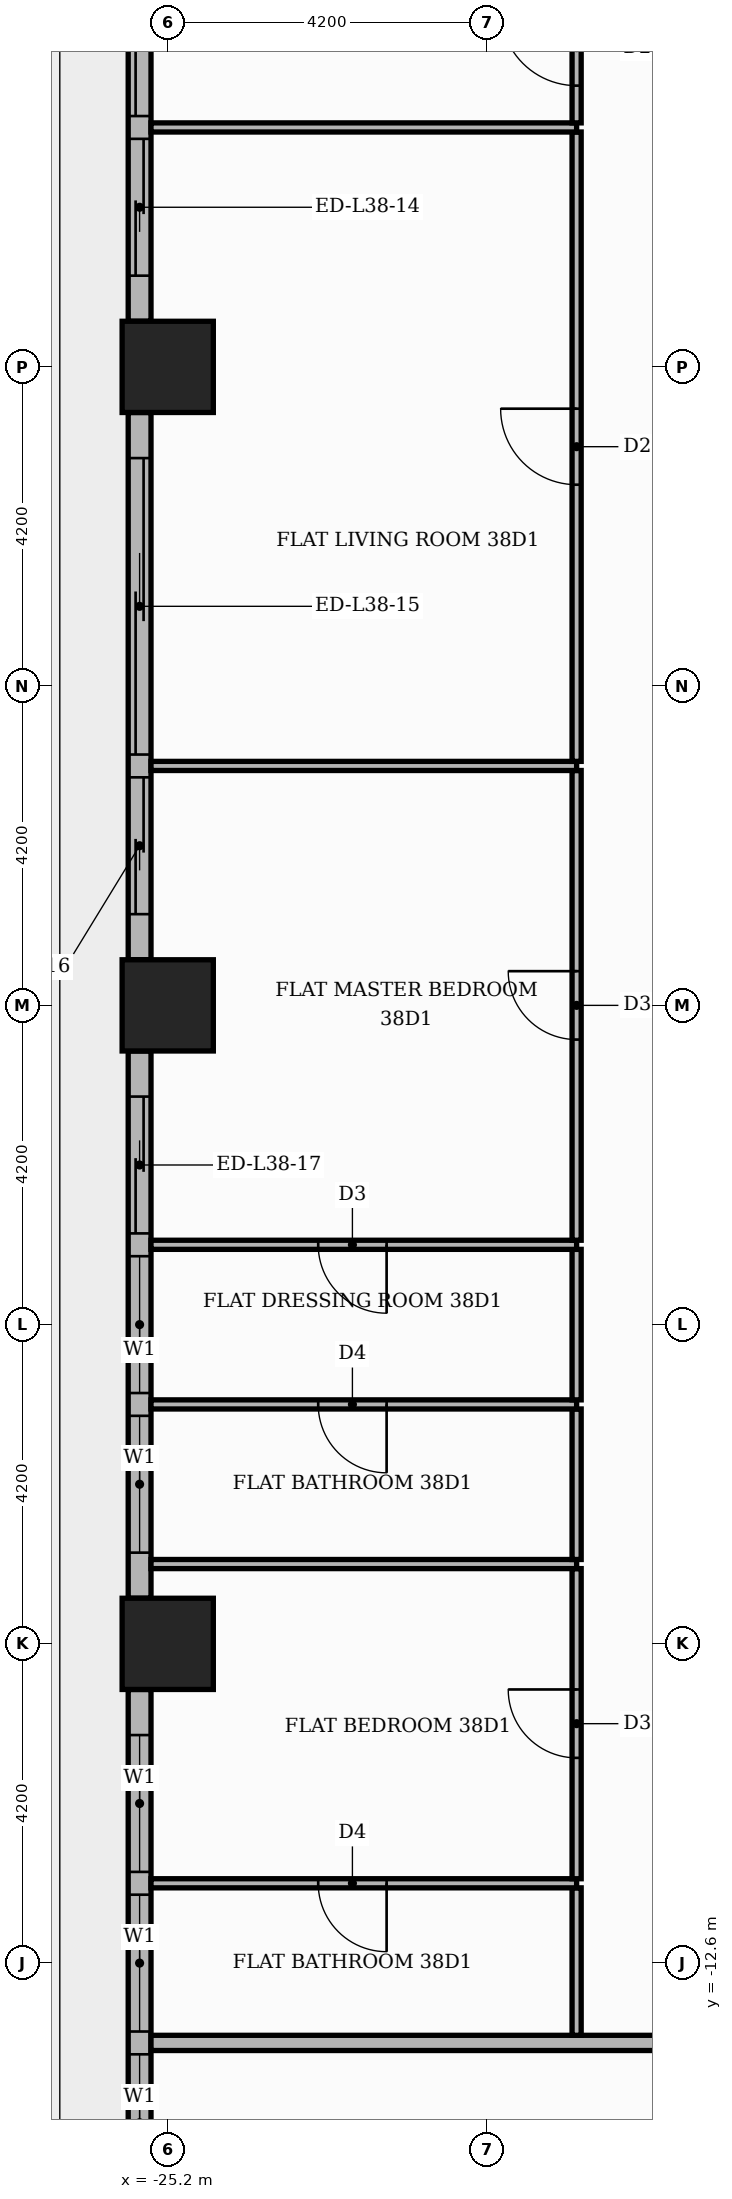
"""IFC4 building model, lengths in metres.
Left out: names, types, materials, properties, quantities, classifications, styles, units other than length and angle.
Written with IfcOpenShell. Run it as: python <this file> out.ifc"""

import sys

from ifc_helpers import new_model, si_unit, direction, frame, frame_2d, origin, origin_2d, place, context, subcontext, project, spatial, rectangle, extrude, element, fill, save


model = new_model("IFC4")
c1 = context("Model", 3, precision=1e-05, world=origin(), true_north=direction((0.0, 1.0)))
c2 = subcontext(c1, "Body", "Model", "MODEL_VIEW")
j1 = project(units=[si_unit("LENGTHUNIT", "METRE"), si_unit("PLANEANGLEUNIT", "RADIAN")], contexts=[c1])
p1 = place(None, origin())
s1 = spatial("IfcSite", under=j1, at=p1, CompositionType="ELEMENT")
p2 = place(p1, origin())
s2 = spatial("IfcBuilding", under=s1, at=p2, CompositionType="ELEMENT")
p3 = place(p2, frame((0.0, 0.0, 161.1)))
s3 = spatial("IfcBuildingStorey", under=s2, at=p3, CompositionType="ELEMENT", Elevation=161.1)
for number, where, z_axis, x_axis in (
    (1, (-25.2, 0.0, 0.0), (0.0, 0.0, 1.0), (1.0, 0.0, 0.0)),
    (2, (-25.2, -8.4, 0.0), (0.0, 0.0, 1.0), (1.0, 0.0, 0.0)),
    (3, (-25.2, 8.4, 0.0), (0.0, 0.0, 1.0), (1.0, 0.0, 0.0)),
):
    element("IfcColumn", number, at=place(p3, frame(where, z_axis=z_axis, x_axis=x_axis)), inside=s3, PredefinedType="COLUMN", context=c2, shape_type="SweptSolid", body=[
        extrude(rectangle(XDim=1.2, YDim=1.2, at=origin_2d()), origin(), (0.0, 0.0, 1.0), 3.9),
    ])
p4 = place(p3, frame((-25.57, 16.2, 0.0), z_axis=(0.0, 0.0, 1.0), x_axis=(0.0, -1.0, 0.0)))
e4 = element("IfcWall", 4, at=p4, inside=s3, PredefinedType="STANDARD", context=c2, shape_type="SweptSolid", body=[
    extrude(rectangle(XDim=7.2, YDim=0.3, at=frame_2d((3.6, 0.0))), origin(), (0.0, 0.0, 1.0), 3.48),
])
p5 = place(p4, frame((0.6, 0.0, 0.0)))
e5 = element("IfcOpeningElement", 5, at=p5, cuts=e4, PredefinedType="OPENING", context=c2, shape_type="SweptSolid", body=[
    extrude(rectangle(XDim=3.9, YDim=2.4, at=frame_2d((1.95, 1.2))), frame((0.0, 0.16, 0.0), z_axis=(0.0, -1.0, 0.0), x_axis=(1.0, 0.0, 0.0)), (0.0, 0.0, 1.0), 0.32),
])
p6 = place(p4, frame((4.8, 0.0, 0.0)))
e6 = element("IfcOpeningElement", 6, at=p6, cuts=e4, PredefinedType="OPENING", context=c2, shape_type="SweptSolid", body=[
    extrude(rectangle(XDim=1.8, YDim=2.4, at=frame_2d((0.9, 1.2))), frame((0.0, 0.16, 0.0), z_axis=(0.0, -1.0, 0.0), x_axis=(1.0, 0.0, 0.0)), (0.0, 0.0, 1.0), 0.32),
])
p7 = place(p3, frame((-25.57, 7.8, 0.0), z_axis=(0.0, 0.0, 1.0), x_axis=(0.0, -1.0, 0.0)))
e7 = element("IfcWall", 7, at=p7, inside=s3, PredefinedType="STANDARD", context=c2, shape_type="SweptSolid", body=[
    extrude(rectangle(XDim=7.2, YDim=0.3, at=frame_2d((3.6, 0.0))), origin(), (0.0, 0.0, 1.0), 3.48),
])
p8 = place(p7, frame((0.6, 0.0, 0.0)))
e8 = element("IfcOpeningElement", 8, at=p8, cuts=e7, PredefinedType="OPENING", context=c2, shape_type="SweptSolid", body=[
    extrude(rectangle(XDim=3.9, YDim=2.4, at=frame_2d((1.95, 1.2))), frame((0.0, 0.16, 0.0), z_axis=(0.0, -1.0, 0.0), x_axis=(1.0, 0.0, 0.0)), (0.0, 0.0, 1.0), 0.32),
])
p9 = place(p7, frame((4.8, 0.0, 0.0)))
e9 = element("IfcOpeningElement", 9, at=p9, cuts=e7, PredefinedType="OPENING", context=c2, shape_type="SweptSolid", body=[
    extrude(rectangle(XDim=1.8, YDim=2.4, at=frame_2d((0.9, 1.2))), frame((0.0, 0.16, 0.0), z_axis=(0.0, -1.0, 0.0), x_axis=(1.0, 0.0, 0.0)), (0.0, 0.0, 1.0), 0.32),
])
p10 = place(p3, frame((-25.57, -0.6, 0.0), z_axis=(0.0, 0.0, 1.0), x_axis=(0.0, -1.0, 0.0)))
e10 = element("IfcWall", 10, at=p10, inside=s3, PredefinedType="STANDARD", context=c2, shape_type="SweptSolid", body=[
    extrude(rectangle(XDim=7.2, YDim=0.3, at=frame_2d((3.6, 0.0))), origin(), (0.0, 0.0, 1.0), 3.48),
])
p11 = place(p10, frame((0.6, 0.0, 0.0)))
e11 = element("IfcOpeningElement", 11, at=p11, cuts=e10, PredefinedType="OPENING", context=c2, shape_type="SweptSolid", body=[
    extrude(rectangle(XDim=1.8, YDim=2.4, at=frame_2d((0.9, 1.2))), frame((0.0, 0.16, 0.0), z_axis=(0.0, -1.0, 0.0), x_axis=(1.0, 0.0, 0.0)), (0.0, 0.0, 1.0), 0.32),
])
p12 = place(p10, frame((2.7, 0.0, 0.9)))
e12 = element("IfcOpeningElement", 12, at=p12, cuts=e10, PredefinedType="OPENING", context=c2, shape_type="SweptSolid", body=[
    extrude(rectangle(XDim=1.8, YDim=2.1, at=frame_2d((0.9, 1.05))), frame((0.0, 0.16, 0.0), z_axis=(0.0, -1.0, 0.0), x_axis=(1.0, 0.0, 0.0)), (0.0, 0.0, 1.0), 0.32),
])
p13 = place(p10, frame((4.8, 0.0, 0.9)))
e13 = element("IfcOpeningElement", 13, at=p13, cuts=e10, PredefinedType="OPENING", context=c2, shape_type="SweptSolid", body=[
    extrude(rectangle(XDim=1.8, YDim=2.1, at=frame_2d((0.9, 1.05))), frame((0.0, 0.16, 0.0), z_axis=(0.0, -1.0, 0.0), x_axis=(1.0, 0.0, 0.0)), (0.0, 0.0, 1.0), 0.32),
])
p14 = place(p3, frame((-25.57, -9.0, 0.0), z_axis=(0.0, 0.0, 1.0), x_axis=(0.0, -1.0, 0.0)))
e14 = element("IfcWall", 14, at=p14, inside=s3, PredefinedType="STANDARD", context=c2, shape_type="SweptSolid", body=[
    extrude(rectangle(XDim=7.2, YDim=0.3, at=frame_2d((3.6, 0.0))), origin(), (0.0, 0.0, 1.0), 3.48),
])
p15 = place(p14, frame((0.6, 0.0, 0.9)))
e15 = element("IfcOpeningElement", 15, at=p15, cuts=e14, PredefinedType="OPENING", context=c2, shape_type="SweptSolid", body=[
    extrude(rectangle(XDim=1.8, YDim=2.1, at=frame_2d((0.9, 1.05))), frame((0.0, 0.16, 0.0), z_axis=(0.0, -1.0, 0.0), x_axis=(1.0, 0.0, 0.0)), (0.0, 0.0, 1.0), 0.32),
])
p16 = place(p14, frame((2.7, 0.0, 0.9)))
e16 = element("IfcOpeningElement", 16, at=p16, cuts=e14, PredefinedType="OPENING", context=c2, shape_type="SweptSolid", body=[
    extrude(rectangle(XDim=1.8, YDim=2.1, at=frame_2d((0.9, 1.05))), frame((0.0, 0.16, 0.0), z_axis=(0.0, -1.0, 0.0), x_axis=(1.0, 0.0, 0.0)), (0.0, 0.0, 1.0), 0.32),
])
p17 = place(p14, frame((4.8, 0.0, 0.9)))
e17 = element("IfcOpeningElement", 17, at=p17, cuts=e14, PredefinedType="OPENING", context=c2, shape_type="SweptSolid", body=[
    extrude(rectangle(XDim=1.8, YDim=2.1, at=frame_2d((0.9, 1.05))), frame((0.0, 0.16, 0.0), z_axis=(0.0, -1.0, 0.0), x_axis=(1.0, 0.0, 0.0)), (0.0, 0.0, 1.0), 0.32),
])
p18 = place(p3, frame((-25.42, -13.65, 0.0), z_axis=(0.0, 0.0, 1.0), x_axis=(1.0, 0.0, 0.0)))
e18 = element("IfcWall", 18, at=p18, inside=s3, PredefinedType="PARTITIONING", context=c2, shape_type="SweptSolid", body=[
    extrude(rectangle(XDim=39.07, YDim=0.2, at=frame_2d((19.535, 0.0))), origin(), (0.0, 0.0, 1.0), 3.48),
])
p19 = place(p18, frame((13.32, 0.0, 0.0)))
e19 = element("IfcOpeningElement", 19, at=p19, cuts=e18, PredefinedType="OPENING", context=c2, shape_type="SweptSolid", body=[
    extrude(rectangle(XDim=1.1, YDim=2.4, at=frame_2d((0.55, 1.2))), frame((0.0, 0.11, 0.0), z_axis=(0.0, -1.0, 0.0), x_axis=(1.0, 0.0, 0.0)), (0.0, 0.0, 1.0), 0.22),
])
p20 = place(p18, frame((21.72, 0.0, 0.0)))
e20 = element("IfcOpeningElement", 20, at=p20, cuts=e18, PredefinedType="OPENING", context=c2, shape_type="SweptSolid", body=[
    extrude(rectangle(XDim=1.1, YDim=2.4, at=frame_2d((0.55, 1.2))), frame((0.0, 0.11, 0.0), z_axis=(0.0, -1.0, 0.0), x_axis=(1.0, 0.0, 0.0)), (0.0, 0.0, 1.0), 0.22),
])
p21 = place(p3, frame((-19.82, -13.55, 0.0), z_axis=(0.0, 0.0, 1.0), x_axis=(0.0, 1.0, 0.0)))
e21 = element("IfcWall", 21, at=p21, inside=s3, PredefinedType="PARTITIONING", context=c2, shape_type="SweptSolid", body=[
    extrude(rectangle(XDim=1.94, YDim=0.12, at=frame_2d((0.97, 0.0))), origin(), (0.0, 0.0, 1.0), 3.48),
])
p22 = place(p3, frame((-25.42, -11.55, 0.0), z_axis=(0.0, 0.0, 1.0), x_axis=(1.0, 0.0, 0.0)))
e22 = element("IfcWall", 22, at=p22, inside=s3, PredefinedType="PARTITIONING", context=c2, shape_type="SweptSolid", body=[
    extrude(rectangle(XDim=5.6, YDim=0.12, at=frame_2d((2.8, 0.0))), origin(), (0.0, 0.0, 1.0), 3.48),
])
p23 = place(p22, frame((2.2, 0.0, 0.0)))
e23 = element("IfcOpeningElement", 23, at=p23, cuts=e22, PredefinedType="OPENING", context=c2, shape_type="SweptSolid", body=[
    extrude(rectangle(XDim=0.9, YDim=2.1, at=frame_2d((0.45, 1.05))), frame((0.0, 0.07, 0.0), z_axis=(0.0, -1.0, 0.0), x_axis=(1.0, 0.0, 0.0)), (0.0, 0.0, 1.0), 0.14),
])
p24 = place(p3, frame((-19.82, -11.49, 0.0), z_axis=(0.0, 0.0, 1.0), x_axis=(0.0, 1.0, 0.0)))
e24 = element("IfcWall", 24, at=p24, inside=s3, PredefinedType="PARTITIONING", context=c2, shape_type="SweptSolid", body=[
    extrude(rectangle(XDim=4.08, YDim=0.12, at=frame_2d((2.04, 0.0))), origin(), (0.0, 0.0, 1.0), 3.48),
])
p25 = place(p24, frame((1.59, 0.0, 0.0)))
e25 = element("IfcOpeningElement", 25, at=p25, cuts=e24, PredefinedType="OPENING", context=c2, shape_type="SweptSolid", body=[
    extrude(rectangle(XDim=0.9, YDim=2.1, at=frame_2d((0.45, 1.05))), frame((0.0, 0.07, 0.0), z_axis=(0.0, -1.0, 0.0), x_axis=(1.0, 0.0, 0.0)), (0.0, 0.0, 1.0), 0.14),
])
p26 = place(p3, frame((-25.42, -7.35, 0.0), z_axis=(0.0, 0.0, 1.0), x_axis=(1.0, 0.0, 0.0)))
e26 = element("IfcWall", 26, at=p26, inside=s3, PredefinedType="PARTITIONING", context=c2, shape_type="SweptSolid", body=[
    extrude(rectangle(XDim=5.6, YDim=0.12, at=frame_2d((2.8, 0.0))), origin(), (0.0, 0.0, 1.0), 3.48),
])
p27 = place(p3, frame((-19.82, -7.29, 0.0), z_axis=(0.0, 0.0, 1.0), x_axis=(0.0, 1.0, 0.0)))
e27 = element("IfcWall", 27, at=p27, inside=s3, PredefinedType="PARTITIONING", context=c2, shape_type="SweptSolid", body=[
    extrude(rectangle(XDim=1.98, YDim=0.12, at=frame_2d((0.99, 0.0))), origin(), (0.0, 0.0, 1.0), 3.48),
])
p28 = place(p3, frame((-25.42, -5.25, 0.0), z_axis=(0.0, 0.0, 1.0), x_axis=(1.0, 0.0, 0.0)))
e28 = element("IfcWall", 28, at=p28, inside=s3, PredefinedType="PARTITIONING", context=c2, shape_type="SweptSolid", body=[
    extrude(rectangle(XDim=5.6, YDim=0.12, at=frame_2d((2.8, 0.0))), origin(), (0.0, 0.0, 1.0), 3.48),
])
p29 = place(p28, frame((2.2, 0.0, 0.0)))
e29 = element("IfcOpeningElement", 29, at=p29, cuts=e28, PredefinedType="OPENING", context=c2, shape_type="SweptSolid", body=[
    extrude(rectangle(XDim=0.9, YDim=2.1, at=frame_2d((0.45, 1.05))), frame((0.0, 0.07, 0.0), z_axis=(0.0, -1.0, 0.0), x_axis=(1.0, 0.0, 0.0)), (0.0, 0.0, 1.0), 0.14),
])
p30 = place(p3, frame((-19.82, -5.19, 0.0), z_axis=(0.0, 0.0, 1.0), x_axis=(0.0, 1.0, 0.0)))
e30 = element("IfcWall", 30, at=p30, inside=s3, PredefinedType="PARTITIONING", context=c2, shape_type="SweptSolid", body=[
    extrude(rectangle(XDim=1.98, YDim=0.12, at=frame_2d((0.99, 0.0))), origin(), (0.0, 0.0, 1.0), 3.48),
])
p31 = place(p3, frame((-25.42, -3.15, 0.0), z_axis=(0.0, 0.0, 1.0), x_axis=(1.0, 0.0, 0.0)))
e31 = element("IfcWall", 31, at=p31, inside=s3, PredefinedType="PARTITIONING", context=c2, shape_type="SweptSolid", body=[
    extrude(rectangle(XDim=5.6, YDim=0.12, at=frame_2d((2.8, 0.0))), origin(), (0.0, 0.0, 1.0), 3.48),
])
p32 = place(p31, frame((2.2, 0.0, 0.0)))
e32 = element("IfcOpeningElement", 32, at=p32, cuts=e31, PredefinedType="OPENING", context=c2, shape_type="SweptSolid", body=[
    extrude(rectangle(XDim=0.9, YDim=2.1, at=frame_2d((0.45, 1.05))), frame((0.0, 0.07, 0.0), z_axis=(0.0, -1.0, 0.0), x_axis=(1.0, 0.0, 0.0)), (0.0, 0.0, 1.0), 0.14),
])
p33 = place(p3, frame((-19.82, -3.09, 0.0), z_axis=(0.0, 0.0, 1.0), x_axis=(0.0, 1.0, 0.0)))
e33 = element("IfcWall", 33, at=p33, inside=s3, PredefinedType="PARTITIONING", context=c2, shape_type="SweptSolid", body=[
    extrude(rectangle(XDim=6.18, YDim=0.12, at=frame_2d((3.09, 0.0))), origin(), (0.0, 0.0, 1.0), 3.48),
])
p34 = place(p33, frame((2.64, 0.0, 0.0)))
e34 = element("IfcOpeningElement", 34, at=p34, cuts=e33, PredefinedType="OPENING", context=c2, shape_type="SweptSolid", body=[
    extrude(rectangle(XDim=0.9, YDim=2.1, at=frame_2d((0.45, 1.05))), frame((0.0, 0.07, 0.0), z_axis=(0.0, -1.0, 0.0), x_axis=(1.0, 0.0, 0.0)), (0.0, 0.0, 1.0), 0.14),
])
p35 = place(p3, frame((-25.42, 3.15, 0.0), z_axis=(0.0, 0.0, 1.0), x_axis=(1.0, 0.0, 0.0)))
e35 = element("IfcWall", 35, at=p35, inside=s3, PredefinedType="PARTITIONING", context=c2, shape_type="SweptSolid", body=[
    extrude(rectangle(XDim=5.6, YDim=0.12, at=frame_2d((2.8, 0.0))), origin(), (0.0, 0.0, 1.0), 3.48),
])
p36 = place(p3, frame((-19.82, 3.21, 0.0), z_axis=(0.0, 0.0, 1.0), x_axis=(0.0, 1.0, 0.0)))
e36 = element("IfcWall", 36, at=p36, inside=s3, PredefinedType="PARTITIONING", context=c2, shape_type="SweptSolid", body=[
    extrude(rectangle(XDim=8.28, YDim=0.12, at=frame_2d((4.14, 0.0))), origin(), (0.0, 0.0, 1.0), 3.48),
])
p37 = place(p36, frame((3.64, 0.0, 0.0)))
e37 = element("IfcOpeningElement", 37, at=p37, cuts=e36, PredefinedType="OPENING", context=c2, shape_type="SweptSolid", body=[
    extrude(rectangle(XDim=1.0, YDim=2.1, at=frame_2d((0.5, 1.05))), frame((0.0, 0.07, 0.0), z_axis=(0.0, -1.0, 0.0), x_axis=(1.0, 0.0, 0.0)), (0.0, 0.0, 1.0), 0.14),
])
p38 = place(p3, frame((-25.42, 11.55, 0.0), z_axis=(0.0, 0.0, 1.0), x_axis=(1.0, 0.0, 0.0)))
e38 = element("IfcWall", 38, at=p38, inside=s3, PredefinedType="PARTITIONING", context=c2, shape_type="SweptSolid", body=[
    extrude(rectangle(XDim=5.6, YDim=0.12, at=frame_2d((2.8, 0.0))), origin(), (0.0, 0.0, 1.0), 3.48),
])
p39 = place(p3, frame((-19.82, 11.61, 0.0), z_axis=(0.0, 0.0, 1.0), x_axis=(0.0, 1.0, 0.0)))
e39 = element("IfcWall", 39, at=p39, inside=s3, PredefinedType="PARTITIONING", context=c2, shape_type="SweptSolid", body=[
    extrude(rectangle(XDim=1.98, YDim=0.12, at=frame_2d((0.99, 0.0))), origin(), (0.0, 0.0, 1.0), 3.48),
])
p40 = place(p39, frame((0.49, 0.0, 0.0)))
e40 = element("IfcOpeningElement", 40, at=p40, cuts=e39, PredefinedType="OPENING", context=c2, shape_type="SweptSolid", body=[
    extrude(rectangle(XDim=1.0, YDim=2.1, at=frame_2d((0.5, 1.05))), frame((0.0, 0.07, 0.0), z_axis=(0.0, -1.0, 0.0), x_axis=(1.0, 0.0, 0.0)), (0.0, 0.0, 1.0), 0.14),
])
p41 = place(p5, origin())
e41 = element("IfcDoor", 41, at=p41, inside=s3, OperationType="SLIDING_TO_LEFT", PredefinedType="DOOR", context=c2, shape_type="SweptSolid", body=[
    extrude(rectangle(XDim=3.9, YDim=2.4, at=frame_2d((1.95, 1.2))), frame((0.0, 0.025, 0.0), z_axis=(0.0, -1.0, 0.0), x_axis=(1.0, 0.0, 0.0)), (0.0, 0.0, 1.0), 0.05),
])
fill(e5, e41)
p42 = place(p6, origin())
e42 = element("IfcDoor", 42, at=p42, inside=s3, OperationType="SLIDING_TO_RIGHT", PredefinedType="DOOR", context=c2, shape_type="SweptSolid", body=[
    extrude(rectangle(XDim=1.8, YDim=2.4, at=frame_2d((0.9, 1.2))), frame((0.0, 0.025, 0.0), z_axis=(0.0, -1.0, 0.0), x_axis=(1.0, 0.0, 0.0)), (0.0, 0.0, 1.0), 0.05),
])
fill(e6, e42)
p43 = place(p8, origin())
e43 = element("IfcDoor", 43, at=p43, inside=s3, OperationType="SLIDING_TO_LEFT", PredefinedType="DOOR", context=c2, shape_type="SweptSolid", body=[
    extrude(rectangle(XDim=3.9, YDim=2.4, at=frame_2d((1.95, 1.2))), frame((0.0, 0.025, 0.0), z_axis=(0.0, -1.0, 0.0), x_axis=(1.0, 0.0, 0.0)), (0.0, 0.0, 1.0), 0.05),
])
fill(e8, e43)
p44 = place(p9, origin())
e44 = element("IfcDoor", 44, at=p44, inside=s3, OperationType="SLIDING_TO_RIGHT", PredefinedType="DOOR", context=c2, shape_type="SweptSolid", body=[
    extrude(rectangle(XDim=1.8, YDim=2.4, at=frame_2d((0.9, 1.2))), frame((0.0, 0.025, 0.0), z_axis=(0.0, -1.0, 0.0), x_axis=(1.0, 0.0, 0.0)), (0.0, 0.0, 1.0), 0.05),
])
fill(e9, e44)
p45 = place(p11, origin())
e45 = element("IfcDoor", 45, at=p45, inside=s3, OperationType="SLIDING_TO_LEFT", PredefinedType="DOOR", context=c2, shape_type="SweptSolid", body=[
    extrude(rectangle(XDim=1.8, YDim=2.4, at=frame_2d((0.9, 1.2))), frame((0.0, 0.025, 0.0), z_axis=(0.0, -1.0, 0.0), x_axis=(1.0, 0.0, 0.0)), (0.0, 0.0, 1.0), 0.05),
])
fill(e11, e45)
p46 = place(p12, origin())
e46 = element("IfcWindow", 46, at=p46, inside=s3, PartitioningType="SINGLE_PANEL", PredefinedType="WINDOW", context=c2, shape_type="SweptSolid", body=[
    extrude(rectangle(XDim=1.8, YDim=2.1, at=frame_2d((0.9, 1.05))), frame((0.0, 0.03, 0.0), z_axis=(0.0, -1.0, 0.0), x_axis=(1.0, 0.0, 0.0)), (0.0, 0.0, 1.0), 0.06),
])
fill(e12, e46)
p47 = place(p13, origin())
e47 = element("IfcWindow", 47, at=p47, inside=s3, PartitioningType="SINGLE_PANEL", PredefinedType="WINDOW", context=c2, shape_type="SweptSolid", body=[
    extrude(rectangle(XDim=1.8, YDim=2.1, at=frame_2d((0.9, 1.05))), frame((0.0, 0.03, 0.0), z_axis=(0.0, -1.0, 0.0), x_axis=(1.0, 0.0, 0.0)), (0.0, 0.0, 1.0), 0.06),
])
fill(e13, e47)
p48 = place(p15, origin())
e48 = element("IfcWindow", 48, at=p48, inside=s3, PartitioningType="SINGLE_PANEL", PredefinedType="WINDOW", context=c2, shape_type="SweptSolid", body=[
    extrude(rectangle(XDim=1.8, YDim=2.1, at=frame_2d((0.9, 1.05))), frame((0.0, 0.03, 0.0), z_axis=(0.0, -1.0, 0.0), x_axis=(1.0, 0.0, 0.0)), (0.0, 0.0, 1.0), 0.06),
])
fill(e15, e48)
p49 = place(p16, origin())
e49 = element("IfcWindow", 49, at=p49, inside=s3, PartitioningType="SINGLE_PANEL", PredefinedType="WINDOW", context=c2, shape_type="SweptSolid", body=[
    extrude(rectangle(XDim=1.8, YDim=2.1, at=frame_2d((0.9, 1.05))), frame((0.0, 0.03, 0.0), z_axis=(0.0, -1.0, 0.0), x_axis=(1.0, 0.0, 0.0)), (0.0, 0.0, 1.0), 0.06),
])
fill(e16, e49)
p50 = place(p17, origin())
e50 = element("IfcWindow", 50, at=p50, inside=s3, PartitioningType="SINGLE_PANEL", PredefinedType="WINDOW", context=c2, shape_type="SweptSolid", body=[
    extrude(rectangle(XDim=1.8, YDim=2.1, at=frame_2d((0.9, 1.05))), frame((0.0, 0.03, 0.0), z_axis=(0.0, -1.0, 0.0), x_axis=(1.0, 0.0, 0.0)), (0.0, 0.0, 1.0), 0.06),
])
fill(e17, e50)
p51 = place(p40, origin())
e51 = element("IfcDoor", 51, at=p51, inside=s3, OperationType="SINGLE_SWING_RIGHT", PredefinedType="DOOR", context=c2, shape_type="SweptSolid", body=[
    extrude(rectangle(XDim=1.0, YDim=2.1, at=frame_2d((0.5, 1.05))), frame((0.0, 0.025, 0.0), z_axis=(0.0, -1.0, 0.0), x_axis=(1.0, 0.0, 0.0)), (0.0, 0.0, 1.0), 0.05),
])
fill(e40, e51)
p52 = place(p37, origin())
e52 = element("IfcDoor", 52, at=p52, inside=s3, OperationType="SINGLE_SWING_RIGHT", PredefinedType="DOOR", context=c2, shape_type="SweptSolid", body=[
    extrude(rectangle(XDim=1.0, YDim=2.1, at=frame_2d((0.5, 1.05))), frame((0.0, 0.025, 0.0), z_axis=(0.0, -1.0, 0.0), x_axis=(1.0, 0.0, 0.0)), (0.0, 0.0, 1.0), 0.05),
])
fill(e37, e52)
p53 = place(p34, origin())
e53 = element("IfcDoor", 53, at=p53, inside=s3, OperationType="SINGLE_SWING_RIGHT", PredefinedType="DOOR", context=c2, shape_type="SweptSolid", body=[
    extrude(rectangle(XDim=0.9, YDim=2.1, at=frame_2d((0.45, 1.05))), frame((0.0, 0.025, 0.0), z_axis=(0.0, -1.0, 0.0), x_axis=(1.0, 0.0, 0.0)), (0.0, 0.0, 1.0), 0.05),
])
fill(e34, e53)
p54 = place(p32, frame((0.9, 0.0, 0.0), z_axis=(0.0, 0.0, 1.0), x_axis=(-1.0, 0.0, 0.0)))
e54 = element("IfcDoor", 54, at=p54, inside=s3, OperationType="SINGLE_SWING_RIGHT", PredefinedType="DOOR", context=c2, shape_type="SweptSolid", body=[
    extrude(rectangle(XDim=0.9, YDim=2.1, at=frame_2d((0.45, 1.05))), frame((0.0, 0.025, 0.0), z_axis=(0.0, -1.0, 0.0), x_axis=(1.0, 0.0, 0.0)), (0.0, 0.0, 1.0), 0.05),
])
fill(e32, e54)
p55 = place(p29, frame((0.9, 0.0, 0.0), z_axis=(0.0, 0.0, 1.0), x_axis=(-1.0, 0.0, 0.0)))
e55 = element("IfcDoor", 55, at=p55, inside=s3, OperationType="SINGLE_SWING_RIGHT", PredefinedType="DOOR", context=c2, shape_type="SweptSolid", body=[
    extrude(rectangle(XDim=0.9, YDim=2.1, at=frame_2d((0.45, 1.05))), frame((0.0, 0.025, 0.0), z_axis=(0.0, -1.0, 0.0), x_axis=(1.0, 0.0, 0.0)), (0.0, 0.0, 1.0), 0.05),
])
fill(e29, e55)
p56 = place(p25, origin())
e56 = element("IfcDoor", 56, at=p56, inside=s3, OperationType="SINGLE_SWING_RIGHT", PredefinedType="DOOR", context=c2, shape_type="SweptSolid", body=[
    extrude(rectangle(XDim=0.9, YDim=2.1, at=frame_2d((0.45, 1.05))), frame((0.0, 0.025, 0.0), z_axis=(0.0, -1.0, 0.0), x_axis=(1.0, 0.0, 0.0)), (0.0, 0.0, 1.0), 0.05),
])
fill(e25, e56)
p57 = place(p23, frame((0.9, 0.0, 0.0), z_axis=(0.0, 0.0, 1.0), x_axis=(-1.0, 0.0, 0.0)))
e57 = element("IfcDoor", 57, at=p57, inside=s3, OperationType="SINGLE_SWING_RIGHT", PredefinedType="DOOR", context=c2, shape_type="SweptSolid", body=[
    extrude(rectangle(XDim=0.9, YDim=2.1, at=frame_2d((0.45, 1.05))), frame((0.0, 0.025, 0.0), z_axis=(0.0, -1.0, 0.0), x_axis=(1.0, 0.0, 0.0)), (0.0, 0.0, 1.0), 0.05),
])
fill(e23, e57)
save(model, sys.argv[1])
